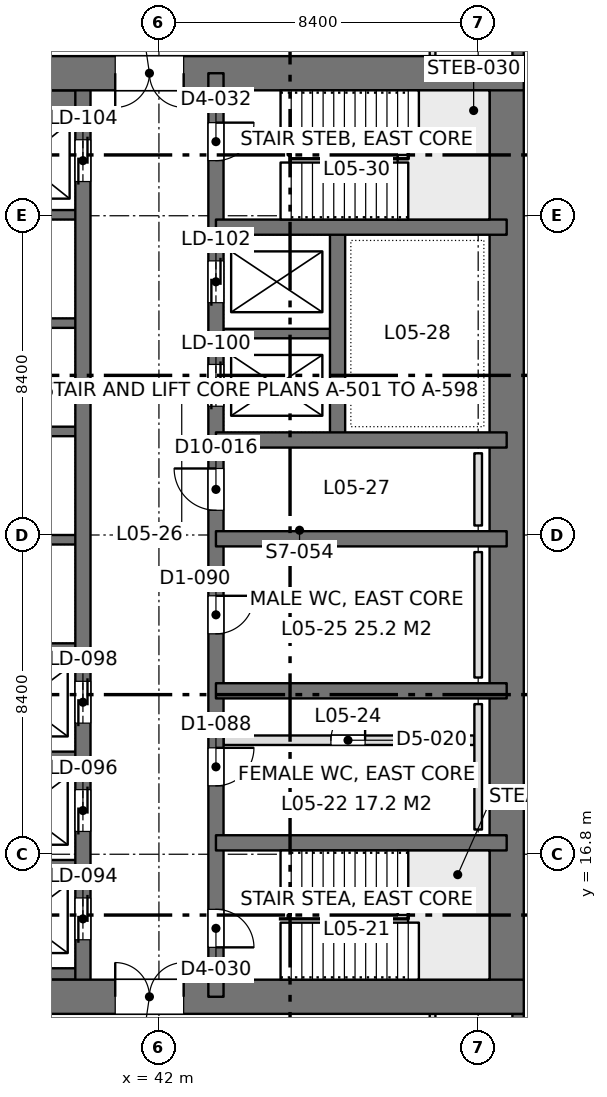
"""IFC4 building model, lengths in metres.
Left out: names, types, materials, properties, quantities, classifications, styles, units other than length and angle.
Written with IfcOpenShell. Run it as: python <this file> out.ifc"""

import sys

from ifc_helpers import new_model, si_unit, direction, frame, frame_2d, origin, place, context, subcontext, project, spatial, rectangle, extrude, element, fill, save


model = new_model("IFC4")
c1 = context("Model", 3, precision=1e-05, world=origin(), true_north=direction((0.0, 1.0)))
c2 = subcontext(c1, "Body", "Model", "MODEL_VIEW")
j1 = project(units=[si_unit("LENGTHUNIT", "METRE"), si_unit("PLANEANGLEUNIT", "RADIAN")], contexts=[c1])
p1 = place(None, origin())
s1 = spatial("IfcSite", under=j1, at=p1, CompositionType="ELEMENT")
p2 = place(p1, origin())
s2 = spatial("IfcBuilding", under=s1, at=p2, CompositionType="ELEMENT")
p3 = place(p2, frame((0.0, 0.0, 23.4)))
s3 = spatial("IfcBuildingStorey", under=s2, at=p3, CompositionType="ELEMENT", Elevation=23.4)
p4 = place(p3, frame((33.6, 13.05, 0.0), z_axis=(0.0, 0.0, 1.0), x_axis=(1.0, 0.0, 0.0)))
e1 = element("IfcWall", 1, at=p4, inside=s3, PredefinedType="SHEAR", context=c2, shape_type="SweptSolid", body=[
    extrude(rectangle(XDim=18.0, YDim=0.9, at=frame_2d((9.0, 0.0))), origin(), (0.0, 0.0, 1.0), 4.5),
])
p5 = place(p4, frame((7.25, 0.0, 0.0)))
e2 = element("IfcOpeningElement", 2, at=p5, cuts=e1, PredefinedType="OPENING", context=c2, shape_type="SweptSolid", body=[
    extrude(rectangle(XDim=1.8, YDim=2.4, at=frame_2d((0.9, 1.2))), frame((0.0, 0.46, 0.0), z_axis=(0.0, -1.0, 0.0), x_axis=(1.0, 0.0, 0.0)), (0.0, 0.0, 1.0), 0.92),
])
p6 = place(p3, frame((33.6, 37.35, 0.0), z_axis=(0.0, 0.0, 1.0), x_axis=(1.0, 0.0, 0.0)))
e3 = element("IfcWall", 3, at=p6, inside=s3, PredefinedType="SHEAR", context=c2, shape_type="SweptSolid", body=[
    extrude(rectangle(XDim=18.0, YDim=0.9, at=frame_2d((9.0, 0.0))), origin(), (0.0, 0.0, 1.0), 4.5),
])
p7 = place(p6, frame((7.25, 0.0, 0.0)))
e4 = element("IfcOpeningElement", 4, at=p7, cuts=e3, PredefinedType="OPENING", context=c2, shape_type="SweptSolid", body=[
    extrude(rectangle(XDim=1.8, YDim=2.4, at=frame_2d((0.9, 1.2))), frame((0.0, 0.46, 0.0), z_axis=(0.0, -1.0, 0.0), x_axis=(1.0, 0.0, 0.0)), (0.0, 0.0, 1.0), 0.92),
])
p8 = place(p3, frame((51.15, 13.05, 0.0), z_axis=(0.0, 0.0, 1.0), x_axis=(0.0, 1.0, 0.0)))
e5 = element("IfcWall", 5, at=p8, inside=s3, PredefinedType="SHEAR", context=c2, shape_type="SweptSolid", body=[
    extrude(rectangle(XDim=24.3, YDim=0.9, at=frame_2d((12.15, 0.0))), origin(), (0.0, 0.0, 1.0), 4.5),
])
p9 = place(p3, frame((43.5, 13.05, 0.0), z_axis=(0.0, 0.0, 1.0), x_axis=(0.0, 1.0, 0.0)))
e6 = element("IfcWall", 6, at=p9, inside=s3, PredefinedType="SHEAR", context=c2, shape_type="SweptSolid", body=[
    extrude(rectangle(XDim=24.3, YDim=0.4, at=frame_2d((12.15, 0.0))), origin(), (0.0, 0.0, 1.0), 4.5),
])
p10 = place(p9, frame((1.3, 0.0, 0.0)))
e7 = element("IfcOpeningElement", 7, at=p10, cuts=e6, PredefinedType="OPENING", context=c2, shape_type="SweptSolid", body=[
    extrude(rectangle(XDim=1.0, YDim=2.2, at=frame_2d((0.5, 1.1))), frame((0.0, 0.21, 0.0), z_axis=(0.0, -1.0, 0.0), x_axis=(1.0, 0.0, 0.0)), (0.0, 0.0, 1.0), 0.42),
])
p11 = place(p9, frame((22.0, 0.0, 0.0)))
e8 = element("IfcOpeningElement", 8, at=p11, cuts=e6, PredefinedType="OPENING", context=c2, shape_type="SweptSolid", body=[
    extrude(rectangle(XDim=1.0, YDim=2.2, at=frame_2d((0.5, 1.1))), frame((0.0, 0.21, 0.0), z_axis=(0.0, -1.0, 0.0), x_axis=(1.0, 0.0, 0.0)), (0.0, 0.0, 1.0), 0.42),
])
p12 = place(p9, frame((5.55, 0.0, 0.0)))
e9 = element("IfcOpeningElement", 9, at=p12, cuts=e6, PredefinedType="OPENING", context=c2, shape_type="SweptSolid", body=[
    extrude(rectangle(XDim=1.0, YDim=2.2, at=frame_2d((0.5, 1.1))), frame((0.0, 0.21, 0.0), z_axis=(0.0, -1.0, 0.0), x_axis=(1.0, 0.0, 0.0)), (0.0, 0.0, 1.0), 0.42),
])
p13 = place(p9, frame((9.55, 0.0, 0.0)))
e10 = element("IfcOpeningElement", 10, at=p13, cuts=e6, PredefinedType="OPENING", context=c2, shape_type="SweptSolid", body=[
    extrude(rectangle(XDim=1.0, YDim=2.2, at=frame_2d((0.5, 1.1))), frame((0.0, 0.21, 0.0), z_axis=(0.0, -1.0, 0.0), x_axis=(1.0, 0.0, 0.0)), (0.0, 0.0, 1.0), 0.42),
])
p14 = place(p9, frame((12.8, 0.0, 0.0)))
e11 = element("IfcOpeningElement", 11, at=p14, cuts=e6, PredefinedType="OPENING", context=c2, shape_type="SweptSolid", body=[
    extrude(rectangle(XDim=1.1, YDim=2.2, at=frame_2d((0.55, 1.1))), frame((0.0, 0.21, 0.0), z_axis=(0.0, -1.0, 0.0), x_axis=(1.0, 0.0, 0.0)), (0.0, 0.0, 1.0), 0.42),
])
p15 = place(p9, frame((15.538, 0.0, 0.0)))
e12 = element("IfcOpeningElement", 12, at=p15, cuts=e6, PredefinedType="OPENING", context=c2, shape_type="SweptSolid", body=[
    extrude(rectangle(XDim=1.1, YDim=2.2, at=frame_2d((0.55, 1.1))), frame((0.0, 0.21, 0.0), z_axis=(0.0, -1.0, 0.0), x_axis=(1.0, 0.0, 0.0)), (0.0, 0.0, 1.0), 0.42),
])
p16 = place(p9, frame((18.262, 0.0, 0.0)))
e13 = element("IfcOpeningElement", 13, at=p16, cuts=e6, PredefinedType="OPENING", context=c2, shape_type="SweptSolid", body=[
    extrude(rectangle(XDim=1.1, YDim=2.2, at=frame_2d((0.55, 1.1))), frame((0.0, 0.21, 0.0), z_axis=(0.0, -1.0, 0.0), x_axis=(1.0, 0.0, 0.0)), (0.0, 0.0, 1.0), 0.42),
])
p17 = place(p3, frame((40.0, 13.05, 0.0), z_axis=(0.0, 0.0, 1.0), x_axis=(0.0, 1.0, 0.0)))
e14 = element("IfcWall", 14, at=p17, inside=s3, PredefinedType="SHEAR", context=c2, shape_type="SweptSolid", body=[
    extrude(rectangle(XDim=24.3, YDim=0.4, at=frame_2d((12.15, 0.0))), origin(), (0.0, 0.0, 1.0), 4.5),
])
p18 = place(p17, frame((1.5, 0.0, 0.0)))
e15 = element("IfcOpeningElement", 15, at=p18, cuts=e14, PredefinedType="OPENING", context=c2, shape_type="SweptSolid", body=[
    extrude(rectangle(XDim=1.1, YDim=2.2, at=frame_2d((0.55, 1.1))), frame((0.0, 0.21, 0.0), z_axis=(0.0, -1.0, 0.0), x_axis=(1.0, 0.0, 0.0)), (0.0, 0.0, 1.0), 0.42),
])
p19 = place(p17, frame((4.35, 0.0, 0.0)))
e16 = element("IfcOpeningElement", 16, at=p19, cuts=e14, PredefinedType="OPENING", context=c2, shape_type="SweptSolid", body=[
    extrude(rectangle(XDim=1.1, YDim=2.2, at=frame_2d((0.55, 1.1))), frame((0.0, 0.21, 0.0), z_axis=(0.0, -1.0, 0.0), x_axis=(1.0, 0.0, 0.0)), (0.0, 0.0, 1.0), 0.42),
])
p20 = place(p17, frame((7.2, 0.0, 0.0)))
e17 = element("IfcOpeningElement", 17, at=p20, cuts=e14, PredefinedType="OPENING", context=c2, shape_type="SweptSolid", body=[
    extrude(rectangle(XDim=1.1, YDim=2.2, at=frame_2d((0.55, 1.1))), frame((0.0, 0.21, 0.0), z_axis=(0.0, -1.0, 0.0), x_axis=(1.0, 0.0, 0.0)), (0.0, 0.0, 1.0), 0.42),
])
p21 = place(p17, frame((21.45, 0.0, 0.0)))
e18 = element("IfcOpeningElement", 18, at=p21, cuts=e14, PredefinedType="OPENING", context=c2, shape_type="SweptSolid", body=[
    extrude(rectangle(XDim=1.1, YDim=2.2, at=frame_2d((0.55, 1.1))), frame((0.0, 0.21, 0.0), z_axis=(0.0, -1.0, 0.0), x_axis=(1.0, 0.0, 0.0)), (0.0, 0.0, 1.0), 0.42),
])
for number, where, z_axis, x_axis in (
    (19, (51.15, 17.1, 0.0), (0.0, 0.0, 1.0), (-1.0, 0.0, 0.0)),
    (20, (51.15, 21.1, 0.0), (0.0, 0.0, 1.0), (-1.0, 0.0, 0.0)),
    (21, (51.15, 25.1, 0.0), (0.0, 0.0, 1.0), (-1.0, 0.0, 0.0)),
    (22, (51.15, 27.7, 0.0), (0.0, 0.0, 1.0), (-1.0, 0.0, 0.0)),
    (23, (51.15, 33.3, 0.0), (0.0, 0.0, 1.0), (-1.0, 0.0, 0.0)),
):
    element("IfcWall", number, at=place(p3, frame(where, z_axis=z_axis, x_axis=x_axis)), inside=s3, PredefinedType="SHEAR", context=c2, shape_type="SweptSolid", body=[
        extrude(rectangle(XDim=7.65, YDim=0.4, at=frame_2d((3.825, 0.0))), origin(), (0.0, 0.0, 1.0), 4.5),
    ])
p22 = place(p3, frame((46.7, 27.7, 0.0), z_axis=(0.0, 0.0, 1.0), x_axis=(0.0, 1.0, 0.0)))
e24 = element("IfcWall", 24, at=p22, inside=s3, PredefinedType="SHEAR", context=c2, shape_type="SweptSolid", body=[
    extrude(rectangle(XDim=5.6, YDim=0.4, at=frame_2d((2.8, 0.0))), origin(), (0.0, 0.0, 1.0), 4.5),
])
p23 = place(p3, frame((46.7, 30.5, 0.0), z_axis=(0.0, 0.0, 1.0), x_axis=(-1.0, 0.0, 0.0)))
e25 = element("IfcWall", 25, at=p23, inside=s3, PredefinedType="SHEAR", context=c2, shape_type="SweptSolid", body=[
    extrude(rectangle(XDim=3.2, YDim=0.25, at=frame_2d((1.6, 0.0))), origin(), (0.0, 0.0, 1.0), 4.5),
])
p24 = place(p3, frame((40.0, 13.65, 0.0), z_axis=(0.0, 0.0, 1.0), x_axis=(-1.0, 0.0, 0.0)))
e26 = element("IfcWall", 26, at=p24, inside=s3, PredefinedType="SHEAR", context=c2, shape_type="SweptSolid", body=[
    extrude(rectangle(XDim=3.2, YDim=0.3, at=frame_2d((1.6, 0.0))), origin(), (0.0, 0.0, 1.0), 4.5),
])
for number, where, z_axis, x_axis in (
    (27, (40.0, 16.525, 0.0), (0.0, 0.0, 1.0), (-1.0, 0.0, 0.0)),
    (28, (40.0, 19.375, 0.0), (0.0, 0.0, 1.0), (-1.0, 0.0, 0.0)),
    (29, (40.0, 22.225, 0.0), (0.0, 0.0, 1.0), (-1.0, 0.0, 0.0)),
    (30, (40.0, 25.075, 0.0), (0.0, 0.0, 1.0), (-1.0, 0.0, 0.0)),
    (31, (40.0, 27.925, 0.0), (0.0, 0.0, 1.0), (-1.0, 0.0, 0.0)),
    (32, (40.0, 30.775, 0.0), (0.0, 0.0, 1.0), (-1.0, 0.0, 0.0)),
    (33, (40.0, 33.625, 0.0), (0.0, 0.0, 1.0), (-1.0, 0.0, 0.0)),
):
    element("IfcWall", number, at=place(p3, frame(where, z_axis=z_axis, x_axis=x_axis)), inside=s3, PredefinedType="SHEAR", context=c2, shape_type="SweptSolid", body=[
        extrude(rectangle(XDim=3.2, YDim=0.25, at=frame_2d((1.6, 0.0))), origin(), (0.0, 0.0, 1.0), 4.5),
    ])
p25 = place(p3, frame((40.0, 36.625, 0.0), z_axis=(0.0, 0.0, 1.0), x_axis=(-1.0, 0.0, 0.0)))
e34 = element("IfcWall", 34, at=p25, inside=s3, PredefinedType="SHEAR", context=c2, shape_type="SweptSolid", body=[
    extrude(rectangle(XDim=3.2, YDim=0.55, at=frame_2d((1.6, 0.0))), origin(), (0.0, 0.0, 1.0), 4.5),
])
p26 = place(p3, frame((51.45, 42.0, 0.0), z_axis=(0.0, 0.0, 1.0), x_axis=(0.0, -1.0, 0.0)))
e35 = element("IfcWall", 35, at=p26, inside=s3, PredefinedType="SOLIDWALL", context=c2, shape_type="SweptSolid", body=[
    extrude(rectangle(XDim=4.2, YDim=0.3, at=frame_2d((2.1, 0.0))), origin(), (0.0, 0.0, 1.0), 4.34),
])
p27 = place(p26, frame((0.9, 0.0, 0.9)))
e36 = element("IfcOpeningElement", 36, at=p27, cuts=e35, PredefinedType="OPENING", context=c2, shape_type="SweptSolid", body=[
    extrude(rectangle(XDim=2.4, YDim=1.9, at=frame_2d((1.2, 0.95))), frame((0.0, 0.16, 0.0), z_axis=(0.0, -1.0, 0.0), x_axis=(1.0, 0.0, 0.0)), (0.0, 0.0, 1.0), 0.32),
])
p28 = place(p3, frame((51.45, 12.6, 0.0), z_axis=(0.0, 0.0, 1.0), x_axis=(0.0, -1.0, 0.0)))
e37 = element("IfcWall", 37, at=p28, inside=s3, PredefinedType="SOLIDWALL", context=c2, shape_type="SweptSolid", body=[
    extrude(rectangle(XDim=4.2, YDim=0.3, at=frame_2d((2.1, 0.0))), origin(), (0.0, 0.0, 1.0), 4.34),
])
p29 = place(p28, frame((0.9, 0.0, 0.9)))
e38 = element("IfcOpeningElement", 38, at=p29, cuts=e37, PredefinedType="OPENING", context=c2, shape_type="SweptSolid", body=[
    extrude(rectangle(XDim=2.4, YDim=1.9, at=frame_2d((1.2, 0.95))), frame((0.0, 0.16, 0.0), z_axis=(0.0, -1.0, 0.0), x_axis=(1.0, 0.0, 0.0)), (0.0, 0.0, 1.0), 0.32),
])
p30 = place(p3, frame((49.2, 10.8, 0.0), z_axis=(0.0, 0.0, 1.0), x_axis=(0.0, 1.0, 0.0)))
e39 = element("IfcWall", 39, at=p30, inside=s3, PredefinedType="PARTITIONING", context=c2, shape_type="SweptSolid", body=[
    extrude(rectangle(XDim=1.802, YDim=0.15, at=frame_2d((0.901, 0.0))), origin(), (0.0, 0.0, 1.0), 4.34),
])
p31 = place(p3, frame((49.2, 37.8, 0.0), z_axis=(0.0, 0.0, 1.0), x_axis=(0.0, 1.0, 0.0)))
e40 = element("IfcWall", 40, at=p31, inside=s3, PredefinedType="PARTITIONING", context=c2, shape_type="SweptSolid", body=[
    extrude(rectangle(XDim=1.8, YDim=0.15, at=frame_2d((0.9, 0.0))), origin(), (0.0, 0.0, 1.0), 4.34),
])
p32 = place(p3, frame((43.7, 19.8, 0.0), z_axis=(0.0, 0.0, 1.0), x_axis=(1.0, 0.0, 0.0)))
e41 = element("IfcWall", 41, at=p32, inside=s3, PredefinedType="PARTITIONING", context=c2, shape_type="SweptSolid", body=[
    extrude(rectangle(XDim=6.6, YDim=0.25, at=frame_2d((3.3, 0.0))), origin(), (0.0, 0.0, 1.0), 4.3),
])
p33 = place(p32, frame((2.825, 0.0, 0.0)))
e42 = element("IfcOpeningElement", 42, at=p33, cuts=e41, PredefinedType="OPENING", context=c2, shape_type="SweptSolid", body=[
    extrude(rectangle(XDim=0.9, YDim=2.2, at=frame_2d((0.45, 1.1))), frame((0.0, 0.135, 0.0), z_axis=(0.0, -1.0, 0.0), x_axis=(1.0, 0.0, 0.0)), (0.0, 0.0, 1.0), 0.27),
])
for number, where, z_axis, x_axis in (
    (43, (50.4, 17.45, 0.0), (0.0, 0.0, 1.0), (0.0, 1.0, 0.0)),
    (44, (50.4, 21.45, 0.0), (0.0, 0.0, 1.0), (0.0, 1.0, 0.0)),
):
    element("IfcWall", number, at=place(p3, frame(where, z_axis=z_axis, x_axis=x_axis)), inside=s3, PredefinedType="PLUMBINGWALL", context=c2, shape_type="SweptSolid", body=[
        extrude(rectangle(XDim=3.3, YDim=0.2, at=frame_2d((1.65, 0.0))), origin(), (0.0, 0.0, 1.0), 1.2),
    ])
p34 = place(p3, frame((50.4, 25.45, 0.0), z_axis=(0.0, 0.0, 1.0), x_axis=(0.0, 1.0, 0.0)))
e45 = element("IfcWall", 45, at=p34, inside=s3, PredefinedType="PLUMBINGWALL", context=c2, shape_type="SweptSolid", body=[
    extrude(rectangle(XDim=1.9, YDim=0.2, at=frame_2d((0.95, 0.0))), origin(), (0.0, 0.0, 1.0), 1.2),
])
p35 = place(p5, origin())
e46 = element("IfcDoor", 46, at=p35, inside=s3, OperationType="DOUBLE_DOOR_SINGLE_SWING", PredefinedType="DOOR", context=c2, shape_type="SweptSolid", body=[
    extrude(rectangle(XDim=1.8, YDim=2.4, at=frame_2d((0.9, 1.2))), frame((0.0, 0.025, 0.0), z_axis=(0.0, -1.0, 0.0), x_axis=(1.0, 0.0, 0.0)), (0.0, 0.0, 1.0), 0.05),
])
fill(e2, e46)
p36 = place(p7, frame((1.8, 0.0, 0.0), z_axis=(0.0, 0.0, 1.0), x_axis=(-1.0, 0.0, 0.0)))
e47 = element("IfcDoor", 47, at=p36, inside=s3, OperationType="DOUBLE_DOOR_SINGLE_SWING", PredefinedType="DOOR", context=c2, shape_type="SweptSolid", body=[
    extrude(rectangle(XDim=1.8, YDim=2.4, at=frame_2d((0.9, 1.2))), frame((0.0, 0.025, 0.0), z_axis=(0.0, -1.0, 0.0), x_axis=(1.0, 0.0, 0.0)), (0.0, 0.0, 1.0), 0.05),
])
fill(e4, e47)
p37 = place(p10, frame((1.0, 0.0, 0.0), z_axis=(0.0, 0.0, 1.0), x_axis=(-1.0, 0.0, 0.0)))
e48 = element("IfcDoor", 48, at=p37, inside=s3, OperationType="SINGLE_SWING_RIGHT", PredefinedType="DOOR", context=c2, shape_type="SweptSolid", body=[
    extrude(rectangle(XDim=1.0, YDim=2.2, at=frame_2d((0.5, 1.1))), frame((0.0, 0.025, 0.0), z_axis=(0.0, -1.0, 0.0), x_axis=(1.0, 0.0, 0.0)), (0.0, 0.0, 1.0), 0.05),
])
fill(e7, e48)
p38 = place(p11, frame((1.0, 0.0, 0.0), z_axis=(0.0, 0.0, 1.0), x_axis=(-1.0, 0.0, 0.0)))
e49 = element("IfcDoor", 49, at=p38, inside=s3, OperationType="SINGLE_SWING_LEFT", PredefinedType="DOOR", context=c2, shape_type="SweptSolid", body=[
    extrude(rectangle(XDim=1.0, YDim=2.2, at=frame_2d((0.5, 1.1))), frame((0.0, 0.025, 0.0), z_axis=(0.0, -1.0, 0.0), x_axis=(1.0, 0.0, 0.0)), (0.0, 0.0, 1.0), 0.05),
])
fill(e8, e49)
p39 = place(p12, frame((1.0, 0.0, 0.0), z_axis=(0.0, 0.0, 1.0), x_axis=(-1.0, 0.0, 0.0)))
e50 = element("IfcDoor", 50, at=p39, inside=s3, OperationType="SINGLE_SWING_LEFT", PredefinedType="DOOR", context=c2, shape_type="SweptSolid", body=[
    extrude(rectangle(XDim=1.0, YDim=2.2, at=frame_2d((0.5, 1.1))), frame((0.0, 0.025, 0.0), z_axis=(0.0, -1.0, 0.0), x_axis=(1.0, 0.0, 0.0)), (0.0, 0.0, 1.0), 0.05),
])
fill(e9, e50)
p40 = place(p13, frame((1.0, 0.0, 0.0), z_axis=(0.0, 0.0, 1.0), x_axis=(-1.0, 0.0, 0.0)))
e51 = element("IfcDoor", 51, at=p40, inside=s3, OperationType="SINGLE_SWING_LEFT", PredefinedType="DOOR", context=c2, shape_type="SweptSolid", body=[
    extrude(rectangle(XDim=1.0, YDim=2.2, at=frame_2d((0.5, 1.1))), frame((0.0, 0.025, 0.0), z_axis=(0.0, -1.0, 0.0), x_axis=(1.0, 0.0, 0.0)), (0.0, 0.0, 1.0), 0.05),
])
fill(e10, e51)
p41 = place(p14, origin())
e52 = element("IfcDoor", 52, at=p41, inside=s3, OperationType="SINGLE_SWING_RIGHT", PredefinedType="DOOR", context=c2, shape_type="SweptSolid", body=[
    extrude(rectangle(XDim=1.1, YDim=2.2, at=frame_2d((0.55, 1.1))), frame((0.0, 0.025, 0.0), z_axis=(0.0, -1.0, 0.0), x_axis=(1.0, 0.0, 0.0)), (0.0, 0.0, 1.0), 0.05),
])
fill(e11, e52)
p42 = place(p18, origin())
e53 = element("IfcDoor", 53, at=p42, inside=s3, OperationType="DOUBLE_DOOR_SLIDING", PredefinedType="DOOR", context=c2, shape_type="SweptSolid", body=[
    extrude(rectangle(XDim=1.1, YDim=2.2, at=frame_2d((0.55, 1.1))), frame((0.0, 0.025, 0.0), z_axis=(0.0, -1.0, 0.0), x_axis=(1.0, 0.0, 0.0)), (0.0, 0.0, 1.0), 0.05),
])
fill(e15, e53)
p43 = place(p19, origin())
e54 = element("IfcDoor", 54, at=p43, inside=s3, OperationType="DOUBLE_DOOR_SLIDING", PredefinedType="DOOR", context=c2, shape_type="SweptSolid", body=[
    extrude(rectangle(XDim=1.1, YDim=2.2, at=frame_2d((0.55, 1.1))), frame((0.0, 0.025, 0.0), z_axis=(0.0, -1.0, 0.0), x_axis=(1.0, 0.0, 0.0)), (0.0, 0.0, 1.0), 0.05),
])
fill(e16, e54)
p44 = place(p20, origin())
e55 = element("IfcDoor", 55, at=p44, inside=s3, OperationType="DOUBLE_DOOR_SLIDING", PredefinedType="DOOR", context=c2, shape_type="SweptSolid", body=[
    extrude(rectangle(XDim=1.1, YDim=2.2, at=frame_2d((0.55, 1.1))), frame((0.0, 0.025, 0.0), z_axis=(0.0, -1.0, 0.0), x_axis=(1.0, 0.0, 0.0)), (0.0, 0.0, 1.0), 0.05),
])
fill(e17, e55)
p45 = place(p21, origin())
e56 = element("IfcDoor", 56, at=p45, inside=s3, OperationType="DOUBLE_DOOR_SLIDING", PredefinedType="DOOR", context=c2, shape_type="SweptSolid", body=[
    extrude(rectangle(XDim=1.1, YDim=2.2, at=frame_2d((0.55, 1.1))), frame((0.0, 0.025, 0.0), z_axis=(0.0, -1.0, 0.0), x_axis=(1.0, 0.0, 0.0)), (0.0, 0.0, 1.0), 0.05),
])
fill(e18, e56)
p46 = place(p15, origin())
e57 = element("IfcDoor", 57, at=p46, inside=s3, OperationType="DOUBLE_DOOR_SLIDING", PredefinedType="DOOR", context=c2, shape_type="SweptSolid", body=[
    extrude(rectangle(XDim=1.1, YDim=2.2, at=frame_2d((0.55, 1.1))), frame((0.0, 0.025, 0.0), z_axis=(0.0, -1.0, 0.0), x_axis=(1.0, 0.0, 0.0)), (0.0, 0.0, 1.0), 0.05),
])
fill(e12, e57)
p47 = place(p16, origin())
e58 = element("IfcDoor", 58, at=p47, inside=s3, OperationType="DOUBLE_DOOR_SLIDING", PredefinedType="DOOR", context=c2, shape_type="SweptSolid", body=[
    extrude(rectangle(XDim=1.1, YDim=2.2, at=frame_2d((0.55, 1.1))), frame((0.0, 0.025, 0.0), z_axis=(0.0, -1.0, 0.0), x_axis=(1.0, 0.0, 0.0)), (0.0, 0.0, 1.0), 0.05),
])
fill(e13, e58)
p48 = place(p33, origin())
e59 = element("IfcDoor", 59, at=p48, inside=s3, OperationType="SINGLE_SWING_RIGHT", PredefinedType="DOOR", context=c2, shape_type="SweptSolid", body=[
    extrude(rectangle(XDim=0.9, YDim=2.2, at=frame_2d((0.45, 1.1))), frame((0.0, 0.025, 0.0), z_axis=(0.0, -1.0, 0.0), x_axis=(1.0, 0.0, 0.0)), (0.0, 0.0, 1.0), 0.05),
])
fill(e42, e59)
save(model, sys.argv[1])
